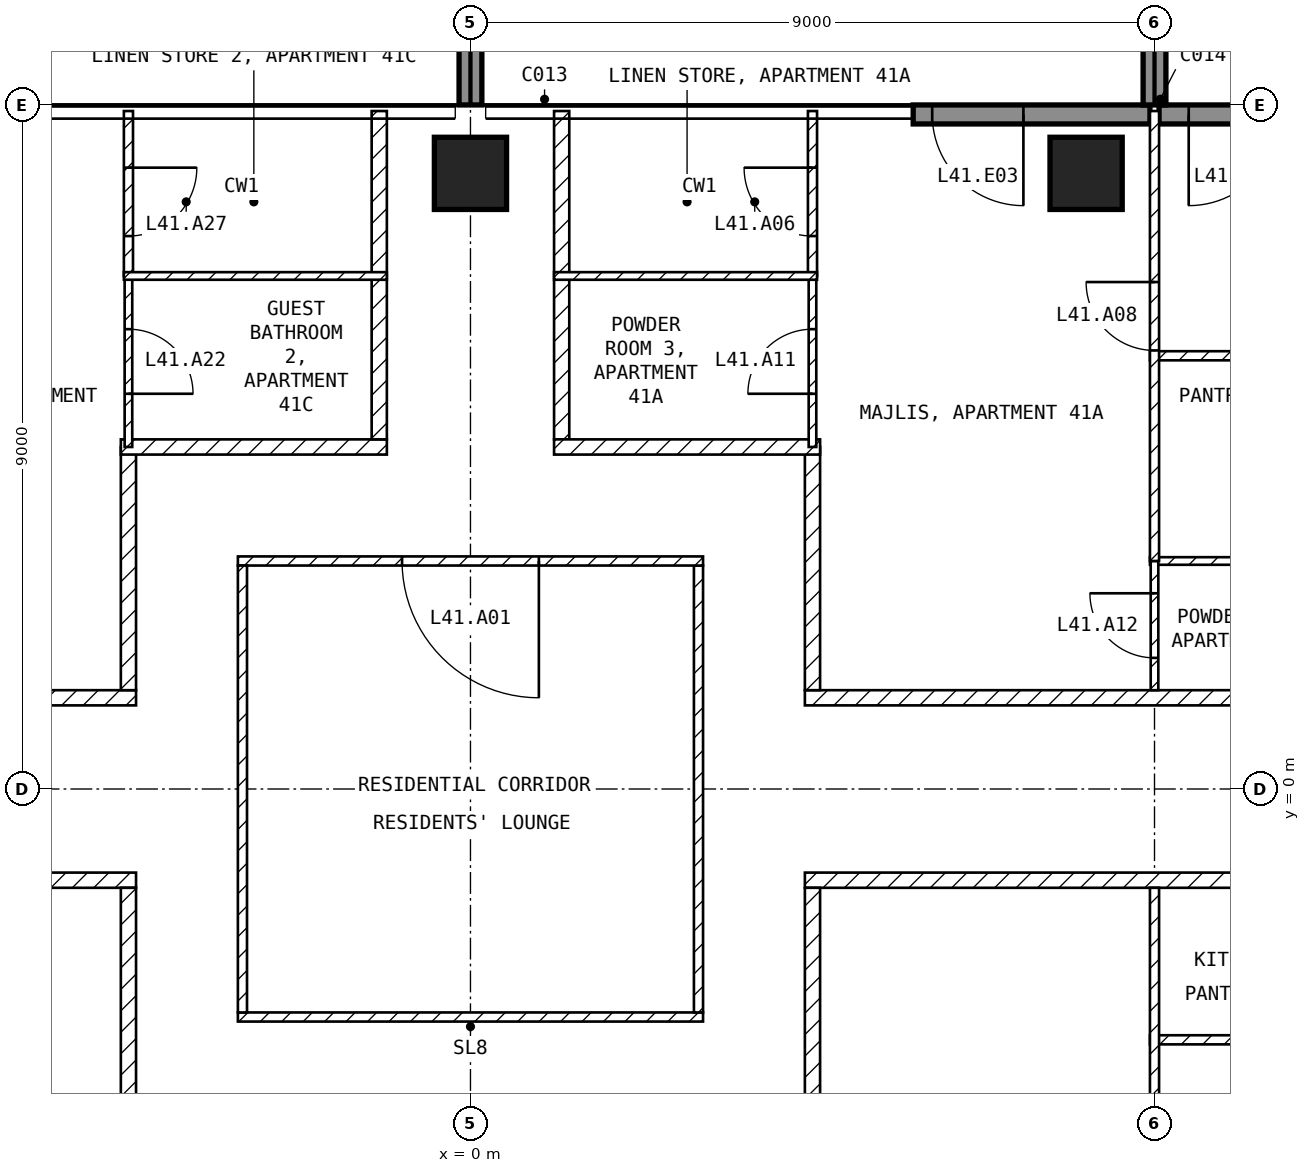
"""IFC4 building model, lengths in metres.
Left out: names, types, materials, properties, quantities, classifications, styles, units other than length and angle.
Written with IfcOpenShell. Run it as: python <this file> out.ifc"""

import sys

from ifc_helpers import new_model, si_unit, direction, frame, frame_2d, origin, origin_2d, place, context, subcontext, project, spatial, rectangle, extrude, element, fill, save


model = new_model("IFC4")
c1 = context("Model", 3, precision=1e-05, world=origin(), true_north=direction((0.0, 1.0)))
c2 = subcontext(c1, "Body", "Model", "MODEL_VIEW")
j1 = project(units=[si_unit("LENGTHUNIT", "METRE"), si_unit("PLANEANGLEUNIT", "RADIAN")], contexts=[c1])
p1 = place(None, origin())
s1 = spatial("IfcSite", under=j1, at=p1, CompositionType="ELEMENT")
p2 = place(p1, origin())
s2 = spatial("IfcBuilding", under=s1, at=p2, CompositionType="ELEMENT")
p3 = place(p2, frame((0.0, 0.0, 170.1)))
s3 = spatial("IfcBuildingStorey", under=s2, at=p3, CompositionType="ELEMENT", Elevation=170.1)
for number, where, z_axis, x_axis in (
    (1, (0.0, 8.1, -0.25), (0.0, 0.0, 1.0), (1.0, 0.0, 0.0)),
    (2, (8.1, 8.1, -0.25), (0.0, 0.0, 1.0), (1.0, 0.0, 0.0)),
):
    element("IfcColumn", number, at=place(p3, frame(where, z_axis=z_axis, x_axis=x_axis)), inside=s3, PredefinedType="COLUMN", context=c2, shape_type="SweptSolid", body=[
        extrude(rectangle(XDim=0.95, YDim=0.95, at=origin_2d()), origin(), (0.0, 0.0, 1.0), 3.5),
    ])
p4 = place(p3, frame((10.9, 8.875, 0.0), z_axis=(0.0, 0.0, 1.0), x_axis=(-1.0, 0.0, 0.0)))
e3 = element("IfcWall", 3, at=p4, inside=s3, PredefinedType="SOLIDWALL", context=c2, shape_type="SweptSolid", body=[
    extrude(rectangle(XDim=1.84, YDim=0.25, at=frame_2d((0.92, 0.0))), origin(), (0.0, 0.0, 1.0), 3.25),
])
p5 = place(p4, frame((0.25, 0.0, 0.0)))
e4 = element("IfcOpeningElement", 4, at=p5, cuts=e3, PredefinedType="OPENING", context=c2, shape_type="SweptSolid", body=[
    extrude(rectangle(XDim=1.2, YDim=2.4, at=frame_2d((0.6, 1.2))), frame((0.0, 0.135, 0.0), z_axis=(0.0, -1.0, 0.0), x_axis=(1.0, 0.0, 0.0)), (0.0, 0.0, 1.0), 0.27),
])
p6 = place(p3, frame((8.94, 8.875, 0.0), z_axis=(0.0, 0.0, 1.0), x_axis=(-1.0, 0.0, 0.0)))
e5 = element("IfcWall", 5, at=p6, inside=s3, PredefinedType="SOLIDWALL", context=c2, shape_type="SweptSolid", body=[
    extrude(rectangle(XDim=3.115, YDim=0.25, at=frame_2d((1.558, 0.0))), origin(), (0.0, 0.0, 1.0), 3.25),
])
p7 = place(p6, frame((1.665, 0.0, 0.0)))
e6 = element("IfcOpeningElement", 6, at=p7, cuts=e5, PredefinedType="OPENING", context=c2, shape_type="SweptSolid", body=[
    extrude(rectangle(XDim=1.2, YDim=2.4, at=frame_2d((0.6, 1.2))), frame((0.0, 0.135, 0.0), z_axis=(0.0, -1.0, 0.0), x_axis=(1.0, 0.0, 0.0)), (0.0, 0.0, 1.0), 0.27),
])
for number, where, z_axis, x_axis in (
    (7, (0.0, 9.0, 0.0), (0.0, 0.0, 1.0), (0.0, 1.0, 0.0)),
    (8, (9.0, 9.0, 0.0), (0.0, 0.0, 1.0), (0.0, 1.0, 0.0)),
):
    element("IfcWall", number, at=place(p3, frame(where, z_axis=z_axis, x_axis=x_axis)), inside=s3, PredefinedType="SOLIDWALL", context=c2, shape_type="SweptSolid", body=[
        extrude(rectangle(XDim=2.7, YDim=0.3, at=frame_2d((1.35, 0.0))), origin(), (0.0, 0.0, 1.0), 3.25),
    ])
p8 = place(p3, frame((-3.06, -3.0, 0.0), z_axis=(0.0, 0.0, 1.0), x_axis=(1.0, 0.0, 0.0)))
e9 = element("IfcWall", 9, at=p8, inside=s3, PredefinedType="PARTITIONING", context=c2, shape_type="SweptSolid", body=[
    extrude(rectangle(XDim=6.12, YDim=0.12, at=frame_2d((3.06, 0.0))), origin(), (0.0, 0.0, 1.0), 3.25),
])
p9 = place(p3, frame((3.0, -2.94, 0.0), z_axis=(0.0, 0.0, 1.0), x_axis=(0.0, 1.0, 0.0)))
e10 = element("IfcWall", 10, at=p9, inside=s3, PredefinedType="PARTITIONING", context=c2, shape_type="SweptSolid", body=[
    extrude(rectangle(XDim=5.88, YDim=0.12, at=frame_2d((2.94, 0.0))), origin(), (0.0, 0.0, 1.0), 3.25),
])
p10 = place(p3, frame((3.06, 3.0, 0.0), z_axis=(0.0, 0.0, 1.0), x_axis=(-1.0, 0.0, 0.0)))
e11 = element("IfcWall", 11, at=p10, inside=s3, PredefinedType="PARTITIONING", context=c2, shape_type="SweptSolid", body=[
    extrude(rectangle(XDim=6.12, YDim=0.12, at=frame_2d((3.06, 0.0))), origin(), (0.0, 0.0, 1.0), 3.25),
])
p11 = place(p10, frame((2.16, 0.0, 0.0)))
e12 = element("IfcOpeningElement", 12, at=p11, cuts=e11, PredefinedType="OPENING", context=c2, shape_type="SweptSolid", body=[
    extrude(rectangle(XDim=1.8, YDim=2.1, at=frame_2d((0.9, 1.05))), frame((0.0, 0.07, 0.0), z_axis=(0.0, -1.0, 0.0), x_axis=(1.0, 0.0, 0.0)), (0.0, 0.0, 1.0), 0.14),
])
p12 = place(p3, frame((-3.0, 2.94, 0.0), z_axis=(0.0, 0.0, 1.0), x_axis=(0.0, -1.0, 0.0)))
e13 = element("IfcWall", 13, at=p12, inside=s3, PredefinedType="PARTITIONING", context=c2, shape_type="SweptSolid", body=[
    extrude(rectangle(XDim=5.88, YDim=0.12, at=frame_2d((2.94, 0.0))), origin(), (0.0, 0.0, 1.0), 3.25),
])
p13 = place(p3, frame((4.4, 1.2, 0.0), z_axis=(0.0, 0.0, 1.0), x_axis=(1.0, 0.0, 0.0)))
e14 = element("IfcWall", 14, at=p13, inside=s3, PredefinedType="PARTITIONING", context=c2, shape_type="SweptSolid", body=[
    extrude(rectangle(XDim=17.2, YDim=0.2, at=frame_2d((8.6, 0.0))), origin(), (0.0, 0.0, 1.0), 3.25),
])
p14 = place(p13, frame((10.475, 0.0, 0.0)))
e15 = element("IfcOpeningElement", 15, at=p14, cuts=e14, PredefinedType="OPENING", context=c2, shape_type="SweptSolid", body=[
    extrude(rectangle(XDim=1.0, YDim=2.1, at=frame_2d((0.5, 1.05))), frame((0.0, 0.11, 0.0), z_axis=(0.0, -1.0, 0.0), x_axis=(1.0, 0.0, 0.0)), (0.0, 0.0, 1.0), 0.22),
])
p15 = place(p3, frame((4.5, 4.5, 0.0), z_axis=(0.0, 0.0, 1.0), x_axis=(0.0, -1.0, 0.0)))
e16 = element("IfcWall", 16, at=p15, inside=s3, PredefinedType="PARTITIONING", context=c2, shape_type="SweptSolid", body=[
    extrude(rectangle(XDim=3.2, YDim=0.2, at=frame_2d((1.6, 0.0))), origin(), (0.0, 0.0, 1.0), 3.25),
])
p16 = place(p3, frame((1.2, 8.92, 0.0), z_axis=(0.0, 0.0, 1.0), x_axis=(0.0, -1.0, 0.0)))
e17 = element("IfcWall", 17, at=p16, inside=s3, PredefinedType="PARTITIONING", context=c2, shape_type="SweptSolid", body=[
    extrude(rectangle(XDim=4.32, YDim=0.2, at=frame_2d((2.16, 0.0))), origin(), (0.0, 0.0, 1.0), 3.25),
])
p17 = place(p3, frame((1.1, 4.5, 0.0), z_axis=(0.0, 0.0, 1.0), x_axis=(1.0, 0.0, 0.0)))
e18 = element("IfcWall", 18, at=p17, inside=s3, PredefinedType="PARTITIONING", context=c2, shape_type="SweptSolid", body=[
    extrude(rectangle(XDim=3.5, YDim=0.2, at=frame_2d((1.75, 0.0))), origin(), (0.0, 0.0, 1.0), 3.25),
])
p18 = place(p3, frame((21.6, -1.2, 0.0), z_axis=(0.0, 0.0, 1.0), x_axis=(-1.0, 0.0, 0.0)))
e19 = element("IfcWall", 19, at=p18, inside=s3, PredefinedType="PARTITIONING", context=c2, shape_type="SweptSolid", body=[
    extrude(rectangle(XDim=17.2, YDim=0.2, at=frame_2d((8.6, 0.0))), origin(), (0.0, 0.0, 1.0), 3.25),
])
p19 = place(p18, frame((3.625, 0.0, 0.0)))
e20 = element("IfcOpeningElement", 20, at=p19, cuts=e19, PredefinedType="OPENING", context=c2, shape_type="SweptSolid", body=[
    extrude(rectangle(XDim=1.0, YDim=2.1, at=frame_2d((0.5, 1.05))), frame((0.0, 0.11, 0.0), z_axis=(0.0, -1.0, 0.0), x_axis=(1.0, 0.0, 0.0)), (0.0, 0.0, 1.0), 0.22),
])
p20 = place(p3, frame((4.5, -1.3, 0.0), z_axis=(0.0, 0.0, 1.0), x_axis=(0.0, -1.0, 0.0)))
e21 = element("IfcWall", 21, at=p20, inside=s3, PredefinedType="PARTITIONING", context=c2, shape_type="SweptSolid", body=[
    extrude(rectangle(XDim=3.2, YDim=0.2, at=frame_2d((1.6, 0.0))), origin(), (0.0, 0.0, 1.0), 3.25),
])
p21 = place(p3, frame((-21.6, 1.2, 0.0), z_axis=(0.0, 0.0, 1.0), x_axis=(1.0, 0.0, 0.0)))
e22 = element("IfcWall", 22, at=p21, inside=s3, PredefinedType="PARTITIONING", context=c2, shape_type="SweptSolid", body=[
    extrude(rectangle(XDim=17.2, YDim=0.2, at=frame_2d((8.6, 0.0))), origin(), (0.0, 0.0, 1.0), 3.25),
])
p22 = place(p21, frame((3.475, 0.0, 0.0)))
e23 = element("IfcOpeningElement", 23, at=p22, cuts=e22, PredefinedType="OPENING", context=c2, shape_type="SweptSolid", body=[
    extrude(rectangle(XDim=1.0, YDim=2.1, at=frame_2d((0.5, 1.05))), frame((0.0, 0.11, 0.0), z_axis=(0.0, -1.0, 0.0), x_axis=(1.0, 0.0, 0.0)), (0.0, 0.0, 1.0), 0.22),
])
p23 = place(p3, frame((-4.5, 1.3, 0.0), z_axis=(0.0, 0.0, 1.0), x_axis=(0.0, 1.0, 0.0)))
e24 = element("IfcWall", 24, at=p23, inside=s3, PredefinedType="PARTITIONING", context=c2, shape_type="SweptSolid", body=[
    extrude(rectangle(XDim=3.2, YDim=0.2, at=frame_2d((1.6, 0.0))), origin(), (0.0, 0.0, 1.0), 3.25),
])
p24 = place(p3, frame((-4.6, 4.5, 0.0), z_axis=(0.0, 0.0, 1.0), x_axis=(1.0, 0.0, 0.0)))
e25 = element("IfcWall", 25, at=p24, inside=s3, PredefinedType="PARTITIONING", context=c2, shape_type="SweptSolid", body=[
    extrude(rectangle(XDim=3.5, YDim=0.2, at=frame_2d((1.75, 0.0))), origin(), (0.0, 0.0, 1.0), 3.25),
])
p25 = place(p3, frame((-1.2, 4.6, 0.0), z_axis=(0.0, 0.0, 1.0), x_axis=(0.0, 1.0, 0.0)))
e26 = element("IfcWall", 26, at=p25, inside=s3, PredefinedType="PARTITIONING", context=c2, shape_type="SweptSolid", body=[
    extrude(rectangle(XDim=4.32, YDim=0.2, at=frame_2d((2.16, 0.0))), origin(), (0.0, 0.0, 1.0), 3.25),
])
p26 = place(p3, frame((-4.4, -1.2, 0.0), z_axis=(0.0, 0.0, 1.0), x_axis=(-1.0, 0.0, 0.0)))
e27 = element("IfcWall", 27, at=p26, inside=s3, PredefinedType="PARTITIONING", context=c2, shape_type="SweptSolid", body=[
    extrude(rectangle(XDim=17.2, YDim=0.2, at=frame_2d((8.6, 0.0))), origin(), (0.0, 0.0, 1.0), 3.25),
])
p27 = place(p26, frame((9.95, 0.0, 0.0)))
e28 = element("IfcOpeningElement", 28, at=p27, cuts=e27, PredefinedType="OPENING", context=c2, shape_type="SweptSolid", body=[
    extrude(rectangle(XDim=1.0, YDim=2.1, at=frame_2d((0.5, 1.05))), frame((0.0, 0.11, 0.0), z_axis=(0.0, -1.0, 0.0), x_axis=(1.0, 0.0, 0.0)), (0.0, 0.0, 1.0), 0.22),
])
p28 = place(p3, frame((-4.5, -4.5, 0.0), z_axis=(0.0, 0.0, 1.0), x_axis=(0.0, 1.0, 0.0)))
e29 = element("IfcWall", 29, at=p28, inside=s3, PredefinedType="PARTITIONING", context=c2, shape_type="SweptSolid", body=[
    extrude(rectangle(XDim=3.2, YDim=0.2, at=frame_2d((1.6, 0.0))), origin(), (0.0, 0.0, 1.0), 3.25),
])
p29 = place(p3, frame((8.94, 3.0, 0.0), z_axis=(0.0, 0.0, 1.0), x_axis=(1.0, 0.0, 0.0)))
e30 = element("IfcWall", 30, at=p29, inside=s3, PredefinedType="PARTITIONING", context=c2, shape_type="SweptSolid", body=[
    extrude(rectangle(XDim=2.46, YDim=0.1, at=frame_2d((1.23, 0.0))), origin(), (0.0, 0.0, 1.0), 3.25),
])
p30 = place(p3, frame((9.0, 1.3, 0.0), z_axis=(0.0, 0.0, 1.0), x_axis=(0.0, 1.0, 0.0)))
e31 = element("IfcWall", 31, at=p30, inside=s3, PredefinedType="PARTITIONING", context=c2, shape_type="SweptSolid", body=[
    extrude(rectangle(XDim=1.7, YDim=0.1, at=frame_2d((0.85, 0.0))), origin(), (0.0, 0.0, 1.0), 3.25),
])
p31 = place(p30, frame((0.425, 0.0, 0.0)))
e32 = element("IfcOpeningElement", 32, at=p31, cuts=e31, PredefinedType="OPENING", context=c2, shape_type="SweptSolid", body=[
    extrude(rectangle(XDim=0.85, YDim=2.1, at=frame_2d((0.425, 1.05))), frame((0.0, 0.06, 0.0), z_axis=(0.0, -1.0, 0.0), x_axis=(1.0, 0.0, 0.0)), (0.0, 0.0, 1.0), 0.12),
])
p32 = place(p3, frame((12.36, 5.7, 0.0), z_axis=(0.0, 0.0, 1.0), x_axis=(-1.0, 0.0, 0.0)))
e33 = element("IfcWall", 33, at=p32, inside=s3, PredefinedType="PARTITIONING", context=c2, shape_type="SweptSolid", body=[
    extrude(rectangle(XDim=3.42, YDim=0.12, at=frame_2d((1.71, 0.0))), origin(), (0.0, 0.0, 1.0), 3.25),
])
p33 = place(p3, frame((9.0, 3.0, 0.0), z_axis=(0.0, 0.0, 1.0), x_axis=(0.0, 1.0, 0.0)))
e34 = element("IfcWall", 34, at=p33, inside=s3, PredefinedType="PARTITIONING", context=c2, shape_type="SweptSolid", body=[
    extrude(rectangle(XDim=5.92, YDim=0.12, at=frame_2d((2.96, 0.0))), origin(), (0.0, 0.0, 1.0), 3.25),
])
p34 = place(p33, frame((2.77, 0.0, 0.0)))
e35 = element("IfcOpeningElement", 35, at=p34, cuts=e34, PredefinedType="OPENING", context=c2, shape_type="SweptSolid", body=[
    extrude(rectangle(XDim=0.9, YDim=2.1, at=frame_2d((0.45, 1.05))), frame((0.0, 0.07, 0.0), z_axis=(0.0, -1.0, 0.0), x_axis=(1.0, 0.0, 0.0)), (0.0, 0.0, 1.0), 0.14),
])
p35 = place(p3, frame((4.5, 4.5, 0.0), z_axis=(0.0, 0.0, 1.0), x_axis=(0.0, 1.0, 0.0)))
e36 = element("IfcWall", 36, at=p35, inside=s3, PredefinedType="PARTITIONING", context=c2, shape_type="SweptSolid", body=[
    extrude(rectangle(XDim=2.25, YDim=0.1, at=frame_2d((1.125, 0.0))), origin(), (0.0, 0.0, 1.0), 3.25),
])
p36 = place(p35, frame((0.7, 0.0, 0.0)))
e37 = element("IfcOpeningElement", 37, at=p36, cuts=e36, PredefinedType="OPENING", context=c2, shape_type="SweptSolid", body=[
    extrude(rectangle(XDim=0.85, YDim=2.1, at=frame_2d((0.425, 1.05))), frame((0.0, 0.06, 0.0), z_axis=(0.0, -1.0, 0.0), x_axis=(1.0, 0.0, 0.0)), (0.0, 0.0, 1.0), 0.12),
])
p37 = place(p3, frame((4.5, 6.75, 0.0), z_axis=(0.0, 0.0, 1.0), x_axis=(0.0, 1.0, 0.0)))
e38 = element("IfcWall", 38, at=p37, inside=s3, PredefinedType="PARTITIONING", context=c2, shape_type="SweptSolid", body=[
    extrude(rectangle(XDim=2.17, YDim=0.12, at=frame_2d((1.085, 0.0))), origin(), (0.0, 0.0, 1.0), 3.25),
])
p38 = place(p37, frame((0.525, 0.0, 0.0)))
e39 = element("IfcOpeningElement", 39, at=p38, cuts=e38, PredefinedType="OPENING", context=c2, shape_type="SweptSolid", body=[
    extrude(rectangle(XDim=0.9, YDim=2.1, at=frame_2d((0.45, 1.05))), frame((0.0, 0.07, 0.0), z_axis=(0.0, -1.0, 0.0), x_axis=(1.0, 0.0, 0.0)), (0.0, 0.0, 1.0), 0.14),
])
p39 = place(p3, frame((1.1, 6.75, 0.0), z_axis=(0.0, 0.0, 1.0), x_axis=(1.0, 0.0, 0.0)))
e40 = element("IfcWall", 40, at=p39, inside=s3, PredefinedType="PARTITIONING", context=c2, shape_type="SweptSolid", body=[
    extrude(rectangle(XDim=3.46, YDim=0.1, at=frame_2d((1.73, 0.0))), origin(), (0.0, 0.0, 1.0), 3.25),
])
p40 = place(p3, frame((18.75, -3.3, 0.0), z_axis=(0.0, 0.0, 1.0), x_axis=(-1.0, 0.0, 0.0)))
e41 = element("IfcWall", 41, at=p40, inside=s3, PredefinedType="PARTITIONING", context=c2, shape_type="SweptSolid", body=[
    extrude(rectangle(XDim=9.81, YDim=0.12, at=frame_2d((4.905, 0.0))), origin(), (0.0, 0.0, 1.0), 3.25),
])
p41 = place(p40, frame((6.0, 0.0, 0.0)))
e42 = element("IfcOpeningElement", 42, at=p41, cuts=e41, PredefinedType="OPENING", context=c2, shape_type="SweptSolid", body=[
    extrude(rectangle(XDim=0.9, YDim=2.1, at=frame_2d((0.45, 1.05))), frame((0.0, 0.07, 0.0), z_axis=(0.0, -1.0, 0.0), x_axis=(1.0, 0.0, 0.0)), (0.0, 0.0, 1.0), 0.14),
])
p42 = place(p40, frame((1.2, 0.0, 0.0)))
e43 = element("IfcOpeningElement", 43, at=p42, cuts=e41, PredefinedType="OPENING", context=c2, shape_type="SweptSolid", body=[
    extrude(rectangle(XDim=0.9, YDim=2.1, at=frame_2d((0.45, 1.05))), frame((0.0, 0.07, 0.0), z_axis=(0.0, -1.0, 0.0), x_axis=(1.0, 0.0, 0.0)), (0.0, 0.0, 1.0), 0.14),
])
p43 = place(p3, frame((9.0, -8.92, 0.0), z_axis=(0.0, 0.0, 1.0), x_axis=(0.0, 1.0, 0.0)))
e44 = element("IfcWall", 44, at=p43, inside=s3, PredefinedType="PARTITIONING", context=c2, shape_type="SweptSolid", body=[
    extrude(rectangle(XDim=7.62, YDim=0.12, at=frame_2d((3.81, 0.0))), origin(), (0.0, 0.0, 1.0), 3.25),
])
p44 = place(p43, frame((2.42, 0.0, 0.0)))
e45 = element("IfcOpeningElement", 45, at=p44, cuts=e44, PredefinedType="OPENING", context=c2, shape_type="SweptSolid", body=[
    extrude(rectangle(XDim=0.9, YDim=2.1, at=frame_2d((0.45, 1.05))), frame((0.0, 0.07, 0.0), z_axis=(0.0, -1.0, 0.0), x_axis=(1.0, 0.0, 0.0)), (0.0, 0.0, 1.0), 0.14),
])
p45 = place(p3, frame((-4.5, 6.75, 0.0), z_axis=(0.0, 0.0, 1.0), x_axis=(0.0, -1.0, 0.0)))
e46 = element("IfcWall", 46, at=p45, inside=s3, PredefinedType="PARTITIONING", context=c2, shape_type="SweptSolid", body=[
    extrude(rectangle(XDim=2.25, YDim=0.1, at=frame_2d((1.125, 0.0))), origin(), (0.0, 0.0, 1.0), 3.25),
])
p46 = place(p45, frame((0.7, 0.0, 0.0)))
e47 = element("IfcOpeningElement", 47, at=p46, cuts=e46, PredefinedType="OPENING", context=c2, shape_type="SweptSolid", body=[
    extrude(rectangle(XDim=0.85, YDim=2.1, at=frame_2d((0.425, 1.05))), frame((0.0, 0.06, 0.0), z_axis=(0.0, -1.0, 0.0), x_axis=(1.0, 0.0, 0.0)), (0.0, 0.0, 1.0), 0.12),
])
p47 = place(p3, frame((-4.5, 8.92, 0.0), z_axis=(0.0, 0.0, 1.0), x_axis=(0.0, -1.0, 0.0)))
e48 = element("IfcWall", 48, at=p47, inside=s3, PredefinedType="PARTITIONING", context=c2, shape_type="SweptSolid", body=[
    extrude(rectangle(XDim=2.17, YDim=0.12, at=frame_2d((1.085, 0.0))), origin(), (0.0, 0.0, 1.0), 3.25),
])
p48 = place(p47, frame((0.745, 0.0, 0.0)))
e49 = element("IfcOpeningElement", 49, at=p48, cuts=e48, PredefinedType="OPENING", context=c2, shape_type="SweptSolid", body=[
    extrude(rectangle(XDim=0.9, YDim=2.1, at=frame_2d((0.45, 1.05))), frame((0.0, 0.07, 0.0), z_axis=(0.0, -1.0, 0.0), x_axis=(1.0, 0.0, 0.0)), (0.0, 0.0, 1.0), 0.14),
])
p49 = place(p3, frame((-4.56, 6.75, 0.0), z_axis=(0.0, 0.0, 1.0), x_axis=(1.0, 0.0, 0.0)))
e50 = element("IfcWall", 50, at=p49, inside=s3, PredefinedType="PARTITIONING", context=c2, shape_type="SweptSolid", body=[
    extrude(rectangle(XDim=3.46, YDim=0.1, at=frame_2d((1.73, 0.0))), origin(), (0.0, 0.0, 1.0), 3.25),
])
p50 = place(p5, origin())
e51 = element("IfcDoor", 51, at=p50, inside=s3, OperationType="SINGLE_SWING_RIGHT", PredefinedType="DOOR", context=c2, shape_type="SweptSolid", body=[
    extrude(rectangle(XDim=1.2, YDim=2.4, at=frame_2d((0.6, 1.2))), frame((0.0, 0.025, 0.0), z_axis=(0.0, -1.0, 0.0), x_axis=(1.0, 0.0, 0.0)), (0.0, 0.0, 1.0), 0.05),
])
fill(e4, e51)
p51 = place(p7, origin())
e52 = element("IfcDoor", 52, at=p51, inside=s3, OperationType="SINGLE_SWING_LEFT", PredefinedType="DOOR", context=c2, shape_type="SweptSolid", body=[
    extrude(rectangle(XDim=1.2, YDim=2.4, at=frame_2d((0.6, 1.2))), frame((0.0, 0.025, 0.0), z_axis=(0.0, -1.0, 0.0), x_axis=(1.0, 0.0, 0.0)), (0.0, 0.0, 1.0), 0.05),
])
fill(e6, e52)
p52 = place(p11, origin())
e53 = element("IfcDoor", 53, at=p52, inside=s3, OperationType="SINGLE_SWING_LEFT", PredefinedType="DOOR", context=c2, shape_type="SweptSolid", body=[
    extrude(rectangle(XDim=1.8, YDim=2.1, at=frame_2d((0.9, 1.05))), frame((0.0, 0.025, 0.0), z_axis=(0.0, -1.0, 0.0), x_axis=(1.0, 0.0, 0.0)), (0.0, 0.0, 1.0), 0.05),
])
fill(e12, e53)
p53 = place(p38, origin())
e54 = element("IfcDoor", 54, at=p53, inside=s3, OperationType="SINGLE_SWING_RIGHT", PredefinedType="DOOR", context=c2, shape_type="SweptSolid", body=[
    extrude(rectangle(XDim=0.9, YDim=2.1, at=frame_2d((0.45, 1.05))), frame((0.0, 0.025, 0.0), z_axis=(0.0, -1.0, 0.0), x_axis=(1.0, 0.0, 0.0)), (0.0, 0.0, 1.0), 0.05),
])
fill(e39, e54)
p54 = place(p34, origin())
e55 = element("IfcDoor", 55, at=p54, inside=s3, OperationType="SINGLE_SWING_RIGHT", PredefinedType="DOOR", context=c2, shape_type="SweptSolid", body=[
    extrude(rectangle(XDim=0.9, YDim=2.1, at=frame_2d((0.45, 1.05))), frame((0.0, 0.025, 0.0), z_axis=(0.0, -1.0, 0.0), x_axis=(1.0, 0.0, 0.0)), (0.0, 0.0, 1.0), 0.05),
])
fill(e35, e55)
p55 = place(p36, origin())
e56 = element("IfcDoor", 56, at=p55, inside=s3, OperationType="SINGLE_SWING_LEFT", PredefinedType="DOOR", context=c2, shape_type="SweptSolid", body=[
    extrude(rectangle(XDim=0.85, YDim=2.1, at=frame_2d((0.425, 1.05))), frame((0.0, 0.025, 0.0), z_axis=(0.0, -1.0, 0.0), x_axis=(1.0, 0.0, 0.0)), (0.0, 0.0, 1.0), 0.05),
])
fill(e37, e56)
p56 = place(p31, origin())
e57 = element("IfcDoor", 57, at=p56, inside=s3, OperationType="SINGLE_SWING_RIGHT", PredefinedType="DOOR", context=c2, shape_type="SweptSolid", body=[
    extrude(rectangle(XDim=0.85, YDim=2.1, at=frame_2d((0.425, 1.05))), frame((0.0, 0.025, 0.0), z_axis=(0.0, -1.0, 0.0), x_axis=(1.0, 0.0, 0.0)), (0.0, 0.0, 1.0), 0.05),
])
fill(e32, e57)
p57 = place(p46, origin())
e58 = element("IfcDoor", 58, at=p57, inside=s3, OperationType="SINGLE_SWING_RIGHT", PredefinedType="DOOR", context=c2, shape_type="SweptSolid", body=[
    extrude(rectangle(XDim=0.85, YDim=2.1, at=frame_2d((0.425, 1.05))), frame((0.0, 0.025, 0.0), z_axis=(0.0, -1.0, 0.0), x_axis=(1.0, 0.0, 0.0)), (0.0, 0.0, 1.0), 0.05),
])
fill(e47, e58)
p58 = place(p48, origin())
e59 = element("IfcDoor", 59, at=p58, inside=s3, OperationType="SINGLE_SWING_LEFT", PredefinedType="DOOR", context=c2, shape_type="SweptSolid", body=[
    extrude(rectangle(XDim=0.9, YDim=2.1, at=frame_2d((0.45, 1.05))), frame((0.0, 0.025, 0.0), z_axis=(0.0, -1.0, 0.0), x_axis=(1.0, 0.0, 0.0)), (0.0, 0.0, 1.0), 0.05),
])
fill(e49, e59)
save(model, sys.argv[1])
